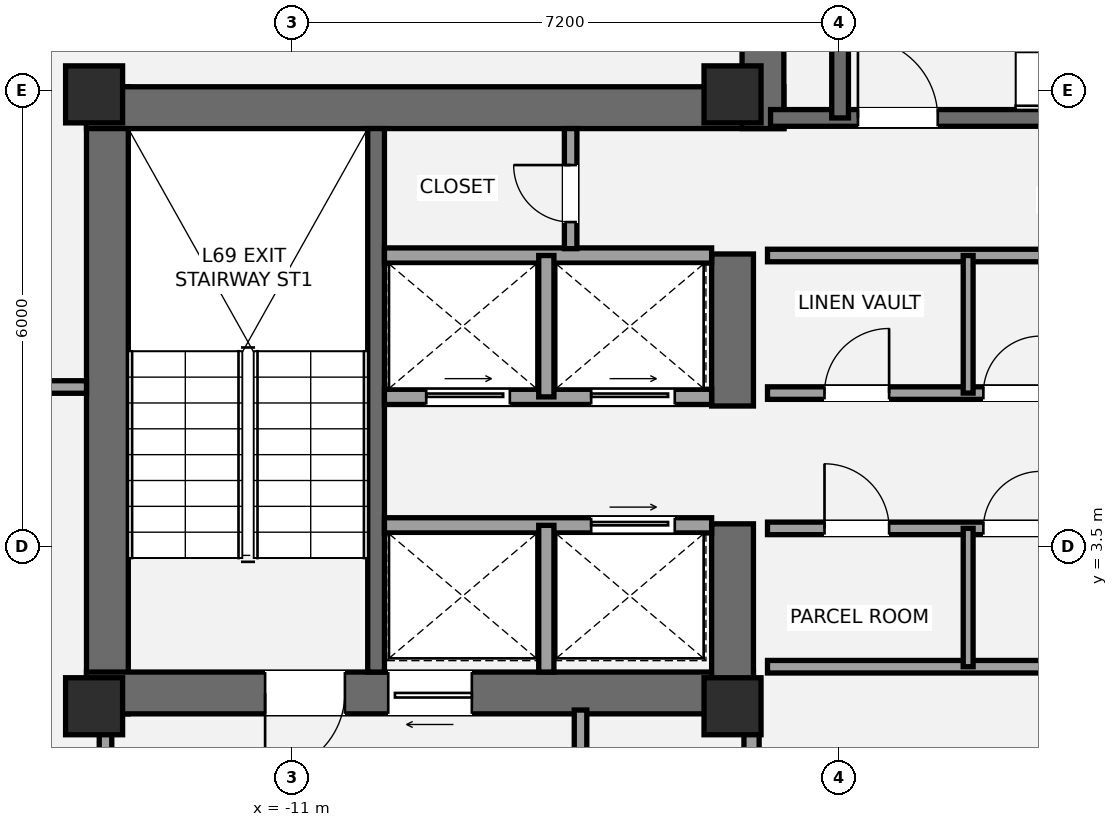
"""IFC4 building model, lengths in metres.
Left out: names, types, materials, properties, quantities, classifications, styles, units other than length and angle.
Written with IfcOpenShell. Run it as: python <this file> out.ifc"""

import sys

from ifc_helpers import new_model, si_unit, direction, frame, frame_2d, origin, origin_2d, place, context, subcontext, project, spatial, rectangle, extrude, element, fill, save


model = new_model("IFC4")
c1 = context("Model", 3, precision=1e-05, world=origin(), true_north=direction((0.0, 1.0)))
c2 = subcontext(c1, "Body", "Model", "MODEL_VIEW")
j1 = project(units=[si_unit("LENGTHUNIT", "METRE"), si_unit("PLANEANGLEUNIT", "RADIAN")], contexts=[c1])
p1 = place(None, origin())
s1 = spatial("IfcSite", under=j1, at=p1, CompositionType="ELEMENT")
p2 = place(p1, origin())
s2 = spatial("IfcBuilding", under=s1, at=p2, CompositionType="ELEMENT")
p3 = place(p2, frame((0.0, 0.0, 244.65)))
s3 = spatial("IfcBuildingStorey", under=s2, at=p3, CompositionType="ELEMENT", Elevation=244.65)
p4 = place(p3, frame((-13.425, 1.3, 0.0), z_axis=(0.0, 0.0, 1.0), x_axis=(0.0, 1.0, 0.0)))
e1 = element("IfcWall", 1, at=p4, inside=s3, PredefinedType="SHEAR", context=c2, shape_type="SweptSolid", body=[
    extrude(rectangle(XDim=8.25, YDim=0.55, at=frame_2d((4.125, 0.0))), origin(), (0.0, 0.0, 1.0), 3.15),
])
p5 = place(p3, frame((-13.7, 9.275, 0.0), z_axis=(0.0, 0.0, 1.0), x_axis=(1.0, 0.0, 0.0)))
e2 = element("IfcWall", 2, at=p5, inside=s3, PredefinedType="SHEAR", context=c2, shape_type="SweptSolid", body=[
    extrude(rectangle(XDim=9.175, YDim=0.55, at=frame_2d((4.587, 0.0))), origin(), (0.0, 0.0, 1.0), 3.15),
])
p6 = place(p3, frame((-4.925, 1.575, 0.0), z_axis=(0.0, 0.0, 1.0), x_axis=(-1.0, 0.0, 0.0)))
e3 = element("IfcWall", 3, at=p6, inside=s3, PredefinedType="SHEAR", context=c2, shape_type="SweptSolid", body=[
    extrude(rectangle(XDim=8.775, YDim=0.55, at=frame_2d((4.387, 0.0))), origin(), (0.0, 0.0, 1.0), 3.15),
])
p7 = place(p6, frame((5.375, 0.0, 0.0)))
e4 = element("IfcOpeningElement", 4, at=p7, cuts=e3, PredefinedType="OPENING", context=c2, shape_type="SweptSolid", body=[
    extrude(rectangle(XDim=1.05, YDim=2.15, at=frame_2d((0.525, 1.075))), frame((0.0, 0.285, 0.0), z_axis=(0.0, -1.0, 0.0), x_axis=(1.0, 0.0, 0.0)), (0.0, 0.0, 1.0), 0.57),
])
p8 = place(p6, frame((3.705, 0.0, 0.0)))
e5 = element("IfcOpeningElement", 5, at=p8, cuts=e3, PredefinedType="OPENING", context=c2, shape_type="SweptSolid", body=[
    extrude(rectangle(XDim=1.1, YDim=2.2, at=frame_2d((0.55, 1.1))), frame((0.0, 0.285, 0.0), z_axis=(0.0, -1.0, 0.0), x_axis=(1.0, 0.0, 0.0)), (0.0, 0.0, 1.0), 0.57),
])
p9 = place(p3, frame((-5.2, 1.3, 0.0), z_axis=(0.0, 0.0, 1.0), x_axis=(0.0, 1.0, 0.0)))
e6 = element("IfcWall", 6, at=p9, inside=s3, PredefinedType="SHEAR", context=c2, shape_type="SweptSolid", body=[
    extrude(rectangle(XDim=2.5, YDim=0.55, at=frame_2d((1.25, 0.0))), origin(), (0.0, 0.0, 1.0), 3.15),
])
p10 = place(p3, frame((-5.2, 5.35, 0.0), z_axis=(0.0, 0.0, 1.0), x_axis=(0.0, 1.0, 0.0)))
e7 = element("IfcWall", 7, at=p10, inside=s3, PredefinedType="SHEAR", context=c2, shape_type="SweptSolid", body=[
    extrude(rectangle(XDim=2.0, YDim=0.55, at=frame_2d((1.0, 0.0))), origin(), (0.0, 0.0, 1.0), 3.15),
])
p11 = place(p3, frame((-9.89, 1.85, 0.0), z_axis=(0.0, 0.0, 1.0), x_axis=(0.0, 1.0, 0.0)))
e8 = element("IfcWall", 8, at=p11, inside=s3, PredefinedType="SHEAR", context=c2, shape_type="SweptSolid", body=[
    extrude(rectangle(XDim=7.15, YDim=0.22, at=frame_2d((3.575, 0.0))), origin(), (0.0, 0.0, 1.0), 3.15),
])
p12 = place(p3, frame((-4.8, 9.0, 0.0), z_axis=(0.0, 0.0, 1.0), x_axis=(0.0, 1.0, 0.0)))
e9 = element("IfcWall", 9, at=p12, inside=s3, PredefinedType="SHEAR", context=c2, shape_type="SweptSolid", body=[
    extrude(rectangle(XDim=3.95, YDim=0.55, at=frame_2d((1.975, 0.0))), origin(), (0.0, 0.0, 1.0), 3.15),
])
p13 = place(p3, frame((-4.7, 9.14, 0.0), z_axis=(0.0, 0.0, 1.0), x_axis=(1.0, 0.0, 0.0)))
e10 = element("IfcWall", 10, at=p13, inside=s3, PredefinedType="SHEAR", context=c2, shape_type="SweptSolid", body=[
    extrude(rectangle(XDim=9.3, YDim=0.22, at=frame_2d((4.65, 0.0))), origin(), (0.0, 0.0, 1.0), 3.15),
])
p14 = place(p13, frame((1.15, 0.0, 0.0)))
e11 = element("IfcOpeningElement", 11, at=p14, cuts=e10, PredefinedType="OPENING", context=c2, shape_type="SweptSolid", body=[
    extrude(rectangle(XDim=1.05, YDim=2.15, at=frame_2d((0.525, 1.075))), frame((0.0, 0.12, 0.0), z_axis=(0.0, -1.0, 0.0), x_axis=(1.0, 0.0, 0.0)), (0.0, 0.0, 1.0), 0.24),
])
p15 = place(p3, frame((-3.785, 9.14, 0.0), z_axis=(0.0, 0.0, 1.0), x_axis=(0.0, 1.0, 0.0)))
e12 = element("IfcWall", 12, at=p15, inside=s3, PredefinedType="SHEAR", context=c2, shape_type="SweptSolid", body=[
    extrude(rectangle(XDim=3.26, YDim=0.22, at=frame_2d((1.63, 0.0))), origin(), (0.0, 0.0, 1.0), 3.15),
])
for number, where, z_axis, x_axis in (
    (13, (-13.6, 1.4, 0.0), (0.0, 0.0, 1.0), (1.0, 0.0, 0.0)),
    (14, (-13.6, 9.45, 0.0), (0.0, 0.0, 1.0), (1.0, 0.0, 0.0)),
    (15, (-5.2, 1.4, 0.0), (0.0, 0.0, 1.0), (1.0, 0.0, 0.0)),
    (16, (-5.2, 9.45, 0.0), (0.0, 0.0, 1.0), (1.0, 0.0, 0.0)),
):
    element("IfcColumn", number, at=place(p3, frame(where, z_axis=z_axis, x_axis=x_axis)), inside=s3, PredefinedType="PILASTER", context=c2, shape_type="SweptSolid", body=[
        extrude(rectangle(XDim=0.75, YDim=0.75, at=origin_2d()), origin(), (0.0, 0.0, 1.0), 3.15),
    ])
p16 = place(p3, frame((-17.381, 9.559, 0.0), z_axis=(0.0, 0.0, 1.0), x_axis=(0.827637036896, 0.561263694851, 0.0)))
e17 = element("IfcWall", 17, at=p16, inside=s3, PredefinedType="STANDARD", context=c2, shape_type="SweptSolid", body=[
    extrude(rectangle(XDim=3.793, YDim=0.44, at=frame_2d((1.896, 0.0))), origin(), (0.0, 0.0, 1.0), 2.336),
])
p17 = place(p16, frame((0.548, 0.0, 0.55)))
e18 = element("IfcOpeningElement", 18, at=p17, cuts=e17, PredefinedType="OPENING", context=c2, shape_type="SweptSolid", body=[
    extrude(rectangle(XDim=1.75, YDim=1.55, at=frame_2d((0.875, 0.775))), frame((0.0, 0.23, 0.0), z_axis=(0.0, -1.0, 0.0), x_axis=(1.0, 0.0, 0.0)), (0.0, 0.0, 1.0), 0.46),
])
p18 = place(p3, frame((-13.45, -2.15, 0.0), z_axis=(0.0, 0.0, 1.0), x_axis=(0.0, 1.0, 0.0)))
e19 = element("IfcWall", 19, at=p18, inside=s3, PredefinedType="PARTITIONING", context=c2, shape_type="SweptSolid", body=[
    extrude(rectangle(XDim=3.5, YDim=0.165, at=frame_2d((1.75, 0.0))), origin(), (0.0, 0.0, 1.0), 2.423),
])
p19 = place(p18, frame((0.67, 0.0, 0.0)))
e20 = element("IfcOpeningElement", 20, at=p19, cuts=e19, PredefinedType="OPENING", context=c2, shape_type="SweptSolid", body=[
    extrude(rectangle(XDim=1.05, YDim=2.15, at=frame_2d((0.525, 1.075))), frame((0.0, 0.093, 0.0), z_axis=(0.0, -1.0, 0.0), x_axis=(1.0, 0.0, 0.0)), (0.0, 0.0, 1.0), 0.185),
])
p20 = place(p3, frame((-7.2, -2.15, 0.0), z_axis=(0.0, 0.0, 1.0), x_axis=(0.0, 1.0, 0.0)))
e21 = element("IfcWall", 21, at=p20, inside=s3, PredefinedType="PARTITIONING", context=c2, shape_type="SweptSolid", body=[
    extrude(rectangle(XDim=3.5, YDim=0.165, at=frame_2d((1.75, 0.0))), origin(), (0.0, 0.0, 1.0), 2.423),
])
p21 = place(p3, frame((-4.95, -2.15, 0.0), z_axis=(0.0, 0.0, 1.0), x_axis=(0.0, 1.0, 0.0)))
e22 = element("IfcWall", 22, at=p21, inside=s3, PredefinedType="SOLIDWALL", context=c2, shape_type="SweptSolid", body=[
    extrude(rectangle(XDim=3.5, YDim=0.2, at=frame_2d((1.75, 0.0))), origin(), (0.0, 0.0, 1.0), 2.423),
])
p22 = place(p21, frame((0.95, 0.0, 0.0)))
e23 = element("IfcOpeningElement", 23, at=p22, cuts=e22, PredefinedType="OPENING", context=c2, shape_type="SweptSolid", body=[
    extrude(rectangle(XDim=0.75, YDim=2.1, at=frame_2d((0.375, 1.05))), frame((0.0, 0.11, 0.0), z_axis=(0.0, -1.0, 0.0), x_axis=(1.0, 0.0, 0.0)), (0.0, 0.0, 1.0), 0.22),
])
p23 = place(p3, frame((-9.78, 3.78, 0.0), z_axis=(0.0, 0.0, 1.0), x_axis=(1.0, 0.0, 0.0)))
e24 = element("IfcWall", 24, at=p23, inside=s3, PredefinedType="SOLIDWALL", context=c2, shape_type="SweptSolid", body=[
    extrude(rectangle(XDim=4.305, YDim=0.2, at=frame_2d((2.152, 0.0))), origin(), (0.0, 0.0, 1.0), 2.97),
])
p24 = place(p23, frame((2.72, 0.0, 0.0)))
e25 = element("IfcOpeningElement", 25, at=p24, cuts=e24, PredefinedType="OPENING", context=c2, shape_type="SweptSolid", body=[
    extrude(rectangle(XDim=1.1, YDim=2.2, at=frame_2d((0.55, 1.1))), frame((0.0, 0.11, 0.0), z_axis=(0.0, -1.0, 0.0), x_axis=(1.0, 0.0, 0.0)), (0.0, 0.0, 1.0), 0.22),
])
p25 = place(p3, frame((-7.65, 1.85, 0.0), z_axis=(0.0, 0.0, 1.0), x_axis=(0.0, 1.0, 0.0)))
e26 = element("IfcWall", 26, at=p25, inside=s3, PredefinedType="SOLIDWALL", context=c2, shape_type="SweptSolid", body=[
    extrude(rectangle(XDim=1.93, YDim=0.2, at=frame_2d((0.965, 0.0))), origin(), (0.0, 0.0, 1.0), 2.97),
])
p26 = place(p3, frame((-9.78, 5.47, 0.0), z_axis=(0.0, 0.0, 1.0), x_axis=(1.0, 0.0, 0.0)))
e27 = element("IfcWall", 27, at=p26, inside=s3, PredefinedType="SOLIDWALL", context=c2, shape_type="SweptSolid", body=[
    extrude(rectangle(XDim=4.305, YDim=0.2, at=frame_2d((2.152, 0.0))), origin(), (0.0, 0.0, 1.0), 2.97),
])
p27 = place(p26, frame((0.55, 0.0, 0.0)))
e28 = element("IfcOpeningElement", 28, at=p27, cuts=e27, PredefinedType="OPENING", context=c2, shape_type="SweptSolid", body=[
    extrude(rectangle(XDim=1.1, YDim=2.2, at=frame_2d((0.55, 1.1))), frame((0.0, 0.11, 0.0), z_axis=(0.0, -1.0, 0.0), x_axis=(1.0, 0.0, 0.0)), (0.0, 0.0, 1.0), 0.22),
])
p28 = place(p26, frame((2.72, 0.0, 0.0)))
e29 = element("IfcOpeningElement", 29, at=p28, cuts=e27, PredefinedType="OPENING", context=c2, shape_type="SweptSolid", body=[
    extrude(rectangle(XDim=1.1, YDim=2.2, at=frame_2d((0.55, 1.1))), frame((0.0, 0.11, 0.0), z_axis=(0.0, -1.0, 0.0), x_axis=(1.0, 0.0, 0.0)), (0.0, 0.0, 1.0), 0.22),
])
p29 = place(p3, frame((-9.78, 7.33, 0.0), z_axis=(0.0, 0.0, 1.0), x_axis=(1.0, 0.0, 0.0)))
e30 = element("IfcWall", 30, at=p29, inside=s3, PredefinedType="SOLIDWALL", context=c2, shape_type="SweptSolid", body=[
    extrude(rectangle(XDim=4.305, YDim=0.2, at=frame_2d((2.152, 0.0))), origin(), (0.0, 0.0, 1.0), 2.97),
])
p30 = place(p3, frame((-7.65, 5.47, 0.0), z_axis=(0.0, 0.0, 1.0), x_axis=(0.0, 1.0, 0.0)))
e31 = element("IfcWall", 31, at=p30, inside=s3, PredefinedType="SOLIDWALL", context=c2, shape_type="SweptSolid", body=[
    extrude(rectangle(XDim=1.86, YDim=0.2, at=frame_2d((0.93, 0.0))), origin(), (0.0, 0.0, 1.0), 2.97),
])
p31 = place(p3, frame((-4.74, 1.92, 0.0), z_axis=(0.0, 0.0, 1.0), x_axis=(1.0, 0.0, 0.0)))
e32 = element("IfcWall", 32, at=p31, inside=s3, PredefinedType="PARTITIONING", context=c2, shape_type="SweptSolid", body=[
    extrude(rectangle(XDim=3.89, YDim=0.165, at=frame_2d((1.945, 0.0))), origin(), (0.0, 0.0, 1.0), 2.11),
])
p32 = place(p3, frame((-4.74, 3.74, 0.0), z_axis=(0.0, 0.0, 1.0), x_axis=(1.0, 0.0, 0.0)))
e33 = element("IfcWall", 33, at=p32, inside=s3, PredefinedType="PARTITIONING", context=c2, shape_type="SweptSolid", body=[
    extrude(rectangle(XDim=3.89, YDim=0.165, at=frame_2d((1.945, 0.0))), origin(), (0.0, 0.0, 1.0), 2.97),
])
p33 = place(p32, frame((0.75, 0.0, 0.0)))
e34 = element("IfcOpeningElement", 34, at=p33, cuts=e33, PredefinedType="OPENING", context=c2, shape_type="SweptSolid", body=[
    extrude(rectangle(XDim=0.85, YDim=2.1, at=frame_2d((0.425, 1.05))), frame((0.0, 0.093, 0.0), z_axis=(0.0, -1.0, 0.0), x_axis=(1.0, 0.0, 0.0)), (0.0, 0.0, 1.0), 0.185),
])
p34 = place(p32, frame((2.84, 0.0, 0.0)))
e35 = element("IfcOpeningElement", 35, at=p34, cuts=e33, PredefinedType="OPENING", context=c2, shape_type="SweptSolid", body=[
    extrude(rectangle(XDim=0.75, YDim=2.1, at=frame_2d((0.375, 1.05))), frame((0.0, 0.093, 0.0), z_axis=(0.0, -1.0, 0.0), x_axis=(1.0, 0.0, 0.0)), (0.0, 0.0, 1.0), 0.185),
])
p35 = place(p3, frame((-2.1, 1.92, 0.0), z_axis=(0.0, 0.0, 1.0), x_axis=(0.0, 1.0, 0.0)))
e36 = element("IfcWall", 36, at=p35, inside=s3, PredefinedType="PARTITIONING", context=c2, shape_type="SweptSolid", body=[
    extrude(rectangle(XDim=1.82, YDim=0.13, at=frame_2d((0.91, 0.0))), origin(), (0.0, 0.0, 1.0), 2.97),
])
p36 = place(p3, frame((-4.74, 5.52, 0.0), z_axis=(0.0, 0.0, 1.0), x_axis=(1.0, 0.0, 0.0)))
e37 = element("IfcWall", 37, at=p36, inside=s3, PredefinedType="PARTITIONING", context=c2, shape_type="SweptSolid", body=[
    extrude(rectangle(XDim=3.89, YDim=0.165, at=frame_2d((1.945, 0.0))), origin(), (0.0, 0.0, 1.0), 2.97),
])
p37 = place(p36, frame((0.75, 0.0, 0.0)))
e38 = element("IfcOpeningElement", 38, at=p37, cuts=e37, PredefinedType="OPENING", context=c2, shape_type="SweptSolid", body=[
    extrude(rectangle(XDim=0.85, YDim=2.1, at=frame_2d((0.425, 1.05))), frame((0.0, 0.093, 0.0), z_axis=(0.0, -1.0, 0.0), x_axis=(1.0, 0.0, 0.0)), (0.0, 0.0, 1.0), 0.185),
])
p38 = place(p36, frame((2.84, 0.0, 0.0)))
e39 = element("IfcOpeningElement", 39, at=p38, cuts=e37, PredefinedType="OPENING", context=c2, shape_type="SweptSolid", body=[
    extrude(rectangle(XDim=0.75, YDim=2.1, at=frame_2d((0.375, 1.05))), frame((0.0, 0.093, 0.0), z_axis=(0.0, -1.0, 0.0), x_axis=(1.0, 0.0, 0.0)), (0.0, 0.0, 1.0), 0.185),
])
p39 = place(p3, frame((-4.74, 7.33, 0.0), z_axis=(0.0, 0.0, 1.0), x_axis=(1.0, 0.0, 0.0)))
e40 = element("IfcWall", 40, at=p39, inside=s3, PredefinedType="PARTITIONING", context=c2, shape_type="SweptSolid", body=[
    extrude(rectangle(XDim=3.89, YDim=0.165, at=frame_2d((1.945, 0.0))), origin(), (0.0, 0.0, 1.0), 2.97),
])
p40 = place(p3, frame((-2.1, 5.52, 0.0), z_axis=(0.0, 0.0, 1.0), x_axis=(0.0, 1.0, 0.0)))
e41 = element("IfcWall", 41, at=p40, inside=s3, PredefinedType="PARTITIONING", context=c2, shape_type="SweptSolid", body=[
    extrude(rectangle(XDim=1.81, YDim=0.13, at=frame_2d((0.905, 0.0))), origin(), (0.0, 0.0, 1.0), 2.97),
])
p41 = place(p3, frame((-7.33, 7.42, 0.0), z_axis=(0.0, 0.0, 1.0), x_axis=(0.0, 1.0, 0.0)))
e42 = element("IfcWall", 42, at=p41, inside=s3, PredefinedType="PARTITIONING", context=c2, shape_type="SweptSolid", body=[
    extrude(rectangle(XDim=1.58, YDim=0.165, at=frame_2d((0.79, 0.0))), origin(), (0.0, 0.0, 1.0), 2.97),
])
p42 = place(p41, frame((0.35, 0.0, 0.0)))
e43 = element("IfcOpeningElement", 43, at=p42, cuts=e42, PredefinedType="OPENING", context=c2, shape_type="SweptSolid", body=[
    extrude(rectangle(XDim=0.75, YDim=2.1, at=frame_2d((0.375, 1.05))), frame((0.0, 0.093, 0.0), z_axis=(0.0, -1.0, 0.0), x_axis=(1.0, 0.0, 0.0)), (0.0, 0.0, 1.0), 0.185),
])
p43 = place(p3, frame((-20.06, 5.6, 0.0), z_axis=(0.0, 0.0, 1.0), x_axis=(1.0, 0.0, 0.0)))
e44 = element("IfcWall", 44, at=p43, inside=s3, PredefinedType="PARTITIONING", context=c2, shape_type="SweptSolid", body=[
    extrude(rectangle(XDim=6.36, YDim=0.165, at=frame_2d((3.18, 0.0))), origin(), (0.0, 0.0, 1.0), 2.423),
])
p44 = place(p43, frame((2.259, 0.0, 0.0)))
e45 = element("IfcOpeningElement", 45, at=p44, cuts=e44, PredefinedType="OPENING", context=c2, shape_type="SweptSolid", body=[
    extrude(rectangle(XDim=0.9, YDim=2.1, at=frame_2d((0.45, 1.05))), frame((0.0, 0.093, 0.0), z_axis=(0.0, -1.0, 0.0), x_axis=(1.0, 0.0, 0.0)), (0.0, 0.0, 1.0), 0.185),
])
p45 = place(p7, origin())
e46 = element("IfcDoor", 46, at=p45, inside=s3, OperationType="SINGLE_SWING_RIGHT", PredefinedType="DOOR", context=c2, shape_type="SweptSolid", body=[
    extrude(rectangle(XDim=1.05, YDim=2.15, at=frame_2d((0.525, 1.075))), frame((0.0, 0.025, 0.0), z_axis=(0.0, -1.0, 0.0), x_axis=(1.0, 0.0, 0.0)), (0.0, 0.0, 1.0), 0.05),
])
fill(e4, e46)
p46 = place(p14, origin())
e47 = element("IfcDoor", 47, at=p46, inside=s3, OperationType="SINGLE_SWING_LEFT", PredefinedType="DOOR", context=c2, shape_type="SweptSolid", body=[
    extrude(rectangle(XDim=1.05, YDim=2.15, at=frame_2d((0.525, 1.075))), frame((0.0, 0.025, 0.0), z_axis=(0.0, -1.0, 0.0), x_axis=(1.0, 0.0, 0.0)), (0.0, 0.0, 1.0), 0.05),
])
fill(e11, e47)
p47 = place(p8, origin())
e48 = element("IfcDoor", 48, at=p47, inside=s3, OperationType="SLIDING_TO_LEFT", PredefinedType="DOOR", context=c2, shape_type="SweptSolid", body=[
    extrude(rectangle(XDim=1.1, YDim=2.2, at=frame_2d((0.55, 1.1))), frame((0.0, 0.025, 0.0), z_axis=(0.0, -1.0, 0.0), x_axis=(1.0, 0.0, 0.0)), (0.0, 0.0, 1.0), 0.05),
])
fill(e5, e48)
p48 = place(p27, origin())
e49 = element("IfcDoor", 49, at=p48, inside=s3, OperationType="SLIDING_TO_LEFT", PredefinedType="DOOR", context=c2, shape_type="SweptSolid", body=[
    extrude(rectangle(XDim=1.1, YDim=2.2, at=frame_2d((0.55, 1.1))), frame((0.0, 0.025, 0.0), z_axis=(0.0, -1.0, 0.0), x_axis=(1.0, 0.0, 0.0)), (0.0, 0.0, 1.0), 0.05),
])
fill(e28, e49)
p49 = place(p28, origin())
e50 = element("IfcDoor", 50, at=p49, inside=s3, OperationType="SLIDING_TO_LEFT", PredefinedType="DOOR", context=c2, shape_type="SweptSolid", body=[
    extrude(rectangle(XDim=1.1, YDim=2.2, at=frame_2d((0.55, 1.1))), frame((0.0, 0.025, 0.0), z_axis=(0.0, -1.0, 0.0), x_axis=(1.0, 0.0, 0.0)), (0.0, 0.0, 1.0), 0.05),
])
fill(e29, e50)
p50 = place(p24, origin())
e51 = element("IfcDoor", 51, at=p50, inside=s3, OperationType="SLIDING_TO_LEFT", PredefinedType="DOOR", context=c2, shape_type="SweptSolid", body=[
    extrude(rectangle(XDim=1.1, YDim=2.2, at=frame_2d((0.55, 1.1))), frame((0.0, 0.025, 0.0), z_axis=(0.0, -1.0, 0.0), x_axis=(1.0, 0.0, 0.0)), (0.0, 0.0, 1.0), 0.05),
])
fill(e25, e51)
p51 = place(p33, origin())
e52 = element("IfcDoor", 52, at=p51, inside=s3, OperationType="SINGLE_SWING_LEFT", PredefinedType="DOOR", context=c2, shape_type="SweptSolid", body=[
    extrude(rectangle(XDim=0.85, YDim=2.1, at=frame_2d((0.425, 1.05))), frame((0.0, 0.025, 0.0), z_axis=(0.0, -1.0, 0.0), x_axis=(1.0, 0.0, 0.0)), (0.0, 0.0, 1.0), 0.05),
])
fill(e34, e52)
p52 = place(p34, origin())
e53 = element("IfcDoor", 53, at=p52, inside=s3, OperationType="SINGLE_SWING_RIGHT", PredefinedType="DOOR", context=c2, shape_type="SweptSolid", body=[
    extrude(rectangle(XDim=0.75, YDim=2.1, at=frame_2d((0.375, 1.05))), frame((0.0, 0.025, 0.0), z_axis=(0.0, -1.0, 0.0), x_axis=(1.0, 0.0, 0.0)), (0.0, 0.0, 1.0), 0.05),
])
fill(e35, e53)
p53 = place(p37, origin())
e54 = element("IfcDoor", 54, at=p53, inside=s3, OperationType="SINGLE_SWING_RIGHT", PredefinedType="DOOR", context=c2, shape_type="SweptSolid", body=[
    extrude(rectangle(XDim=0.85, YDim=2.1, at=frame_2d((0.425, 1.05))), frame((0.0, 0.025, 0.0), z_axis=(0.0, -1.0, 0.0), x_axis=(1.0, 0.0, 0.0)), (0.0, 0.0, 1.0), 0.05),
])
fill(e38, e54)
p54 = place(p38, origin())
e55 = element("IfcDoor", 55, at=p54, inside=s3, OperationType="SINGLE_SWING_RIGHT", PredefinedType="DOOR", context=c2, shape_type="SweptSolid", body=[
    extrude(rectangle(XDim=0.75, YDim=2.1, at=frame_2d((0.375, 1.05))), frame((0.0, 0.025, 0.0), z_axis=(0.0, -1.0, 0.0), x_axis=(1.0, 0.0, 0.0)), (0.0, 0.0, 1.0), 0.05),
])
fill(e39, e55)
p55 = place(p42, origin())
e56 = element("IfcDoor", 56, at=p55, inside=s3, OperationType="SINGLE_SWING_RIGHT", PredefinedType="DOOR", context=c2, shape_type="SweptSolid", body=[
    extrude(rectangle(XDim=0.75, YDim=2.1, at=frame_2d((0.375, 1.05))), frame((0.0, 0.025, 0.0), z_axis=(0.0, -1.0, 0.0), x_axis=(1.0, 0.0, 0.0)), (0.0, 0.0, 1.0), 0.05),
])
fill(e43, e56)
save(model, sys.argv[1])
